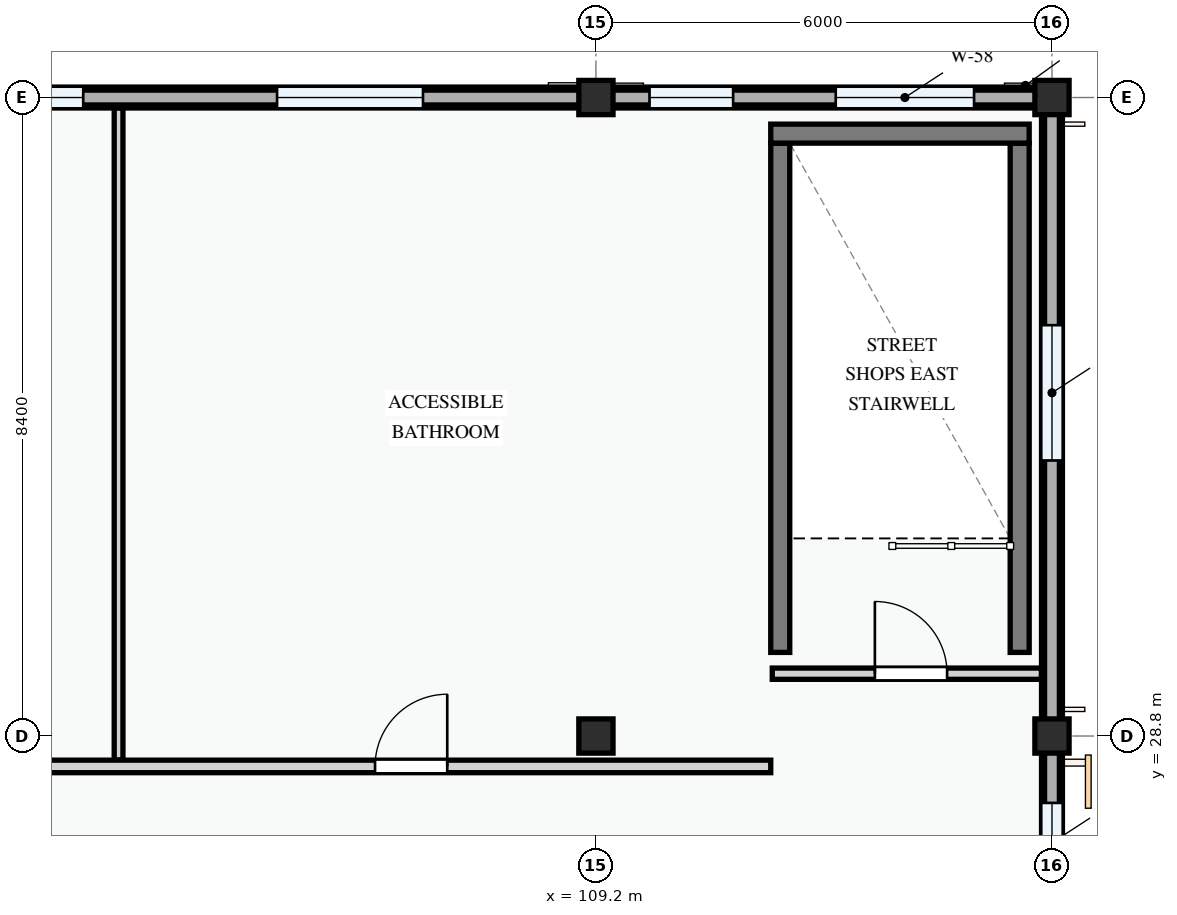
"""IFC4 building model, lengths in metres.
Left out: names, types, materials, properties, quantities, classifications, styles, units other than length and angle.
Written with IfcOpenShell. Run it as: python <this file> out.ifc"""

import sys

from ifc_helpers import new_model, si_unit, direction, frame, frame_2d, origin, origin_2d, place, context, subcontext, project, spatial, rectangle, extrude, element, fill, save


model = new_model("IFC4")
c1 = context("Model", 3, precision=1e-05, world=origin(), true_north=direction((0.0, 1.0)))
c2 = subcontext(c1, "Body", "Model", "MODEL_VIEW")
j1 = project(units=[si_unit("LENGTHUNIT", "METRE"), si_unit("PLANEANGLEUNIT", "RADIAN")], contexts=[c1])
p1 = place(None, origin())
s1 = spatial("IfcSite", under=j1, at=p1, CompositionType="ELEMENT")
p2 = place(p1, origin())
s2 = spatial("IfcBuilding", under=s1, at=p2, CompositionType="ELEMENT")
p3 = place(p2, frame((0.0, 0.0, 4.5)))
s3 = spatial("IfcBuildingStorey", under=s2, at=p3, CompositionType="ELEMENT", Elevation=4.5)
for number, where, z_axis, x_axis in (
    (1, (109.2, 28.8, 0.0), (0.0, 0.0, 1.0), (1.0, 0.0, 0.0)),
    (2, (109.2, 37.2, 0.0), (0.0, 0.0, 1.0), (1.0, 0.0, 0.0)),
    (3, (115.2, 28.8, 0.0), (0.0, 0.0, 1.0), (1.0, 0.0, 0.0)),
    (4, (115.2, 37.2, 0.0), (0.0, 0.0, 1.0), (1.0, 0.0, 0.0)),
):
    element("IfcColumn", number, at=place(p3, frame(where, z_axis=z_axis, x_axis=x_axis)), inside=s3, PredefinedType="COLUMN", context=c2, shape_type="SweptSolid", body=[
        extrude(rectangle(XDim=0.45, YDim=0.45, at=origin_2d()), origin(), (0.0, 0.0, 1.0), 3.6),
    ])
p4 = place(p3, frame((115.2, 22.8, 0.0), z_axis=(0.0, 0.0, 1.0), x_axis=(0.0, 1.0, 0.0)))
e5 = element("IfcWall", 5, at=p4, inside=s3, PredefinedType="STANDARD", context=c2, shape_type="SweptSolid", body=[
    extrude(rectangle(XDim=6.0, YDim=0.275, at=frame_2d((3.0, 0.0))), origin(), (0.0, 0.0, 1.0), 2.875),
])
p5 = place(p4, frame((1.075, 0.0, 0.8)))
e6 = element("IfcOpeningElement", 6, at=p5, cuts=e5, PredefinedType="OPENING", context=c2, shape_type="SweptSolid", body=[
    extrude(rectangle(XDim=1.42, YDim=1.38, at=frame_2d((0.71, 0.69))), frame((0.0, 0.147, 0.0), z_axis=(0.0, -1.0, 0.0), x_axis=(1.0, 0.0, 0.0)), (0.0, 0.0, 1.0), 0.295),
])
p6 = place(p4, frame((4.07, 0.0, 0.8)))
e7 = element("IfcOpeningElement", 7, at=p6, cuts=e5, PredefinedType="OPENING", context=c2, shape_type="SweptSolid", body=[
    extrude(rectangle(XDim=1.05, YDim=1.2, at=frame_2d((0.525, 0.6))), frame((0.0, 0.147, 0.0), z_axis=(0.0, -1.0, 0.0), x_axis=(1.0, 0.0, 0.0)), (0.0, 0.0, 1.0), 0.295),
])
p7 = place(p3, frame((115.2, 28.8, 0.0), z_axis=(0.0, 0.0, 1.0), x_axis=(0.0, 1.0, 0.0)))
e8 = element("IfcWall", 8, at=p7, inside=s3, PredefinedType="STANDARD", context=c2, shape_type="SweptSolid", body=[
    extrude(rectangle(XDim=8.4, YDim=0.275, at=frame_2d((4.2, 0.0))), origin(), (0.0, 0.0, 1.0), 2.725),
])
p8 = place(p7, frame((3.625, 0.0, 0.8)))
e9 = element("IfcOpeningElement", 9, at=p8, cuts=e8, PredefinedType="OPENING", context=c2, shape_type="SweptSolid", body=[
    extrude(rectangle(XDim=1.78, YDim=1.42, at=frame_2d((0.89, 0.71))), frame((0.0, 0.147, 0.0), z_axis=(0.0, -1.0, 0.0), x_axis=(1.0, 0.0, 0.0)), (0.0, 0.0, 1.0), 0.295),
])
p9 = place(p3, frame((115.2, 37.2, 0.0), z_axis=(0.0, 0.0, 1.0), x_axis=(-1.0, 0.0, 0.0)))
e10 = element("IfcWall", 10, at=p9, inside=s3, PredefinedType="STANDARD", context=c2, shape_type="SweptSolid", body=[
    extrude(rectangle(XDim=6.0, YDim=0.275, at=frame_2d((3.0, 0.0))), origin(), (0.0, 0.0, 1.0), 2.775),
])
p10 = place(p9, frame((1.025, 0.0, 0.8)))
e11 = element("IfcOpeningElement", 11, at=p10, cuts=e10, PredefinedType="OPENING", context=c2, shape_type="SweptSolid", body=[
    extrude(rectangle(XDim=1.82, YDim=1.46, at=frame_2d((0.91, 0.73))), frame((0.0, 0.147, 0.0), z_axis=(0.0, -1.0, 0.0), x_axis=(1.0, 0.0, 0.0)), (0.0, 0.0, 1.0), 0.295),
])
p11 = place(p9, frame((4.195, 0.0, 0.8)))
e12 = element("IfcOpeningElement", 12, at=p11, cuts=e10, PredefinedType="OPENING", context=c2, shape_type="SweptSolid", body=[
    extrude(rectangle(XDim=1.1, YDim=1.3, at=frame_2d((0.55, 0.65))), frame((0.0, 0.147, 0.0), z_axis=(0.0, -1.0, 0.0), x_axis=(1.0, 0.0, 0.0)), (0.0, 0.0, 1.0), 0.295),
])
p12 = place(p3, frame((109.2, 37.2, 0.0), z_axis=(0.0, 0.0, 1.0), x_axis=(-1.0, 0.0, 0.0)))
e13 = element("IfcWall", 13, at=p12, inside=s3, PredefinedType="STANDARD", context=c2, shape_type="SweptSolid", body=[
    extrude(rectangle(XDim=8.4, YDim=0.275, at=frame_2d((4.2, 0.0))), origin(), (0.0, 0.0, 1.0), 2.675),
])
p13 = place(p12, frame((2.275, 0.0, 0.8)))
e14 = element("IfcOpeningElement", 14, at=p13, cuts=e13, PredefinedType="OPENING", context=c2, shape_type="SweptSolid", body=[
    extrude(rectangle(XDim=1.92, YDim=1.44, at=frame_2d((0.96, 0.72))), frame((0.0, 0.147, 0.0), z_axis=(0.0, -1.0, 0.0), x_axis=(1.0, 0.0, 0.0)), (0.0, 0.0, 1.0), 0.295),
])
p14 = place(p12, frame((6.745, 0.0, 0.8)))
e15 = element("IfcOpeningElement", 15, at=p14, cuts=e13, PredefinedType="OPENING", context=c2, shape_type="SweptSolid", body=[
    extrude(rectangle(XDim=1.0, YDim=1.25, at=frame_2d((0.5, 0.625))), frame((0.0, 0.147, 0.0), z_axis=(0.0, -1.0, 0.0), x_axis=(1.0, 0.0, 0.0)), (0.0, 0.0, 1.0), 0.295),
])
p15 = place(p3, frame((115.2, 22.8, 3.6), z_axis=(0.0, 0.0, 1.0), x_axis=(0.0, 1.0, 0.0)))
e16 = element("IfcWall", 16, at=p15, inside=s3, PredefinedType="PARAPET", context=c2, shape_type="SweptSolid", body=[
    extrude(rectangle(XDim=14.4, YDim=0.195, at=frame_2d((7.2, 0.0))), origin(), (0.0, 0.0, 1.0), 1.15),
])
p16 = place(p3, frame((115.2, 37.2, 3.6), z_axis=(0.0, 0.0, 1.0), x_axis=(-1.0, 0.0, 0.0)))
e17 = element("IfcWall", 17, at=p16, inside=s3, PredefinedType="PARAPET", context=c2, shape_type="SweptSolid", body=[
    extrude(rectangle(XDim=49.2, YDim=0.195, at=frame_2d((24.6, 0.0))), origin(), (0.0, 0.0, 1.0), 1.15),
])
for number, where, z_axis, x_axis in (
    (18, (114.775, 29.9, 0.0), (0.0, 0.0, 1.0), (0.0, 1.0, 0.0)),
    (19, (111.625, 29.9, 0.0), (0.0, 0.0, 1.0), (0.0, 1.0, 0.0)),
):
    element("IfcWall", number, at=place(p3, frame(where, z_axis=z_axis, x_axis=x_axis)), inside=s3, PredefinedType="SHEAR", context=c2, shape_type="SweptSolid", body=[
        extrude(rectangle(XDim=6.7, YDim=0.25, at=frame_2d((3.35, 0.0))), origin(), (0.0, 0.0, 1.0), 3.3),
    ])
p17 = place(p3, frame((114.9, 36.725, 0.0), z_axis=(0.0, 0.0, 1.0), x_axis=(-1.0, 0.0, 0.0)))
e20 = element("IfcWall", 20, at=p17, inside=s3, PredefinedType="SHEAR", context=c2, shape_type="SweptSolid", body=[
    extrude(rectangle(XDim=3.4, YDim=0.25, at=frame_2d((1.7, 0.0))), origin(), (0.0, 0.0, 1.0), 3.3),
])
p18 = place(p3, frame((102.92, 28.485, 0.0), z_axis=(0.0, 0.0, 1.0), x_axis=(0.0, 1.0, 0.0)))
e21 = element("IfcWall", 21, at=p18, inside=s3, PredefinedType="PARTITIONING", context=c2, shape_type="SweptSolid", body=[
    extrude(rectangle(XDim=8.576, YDim=0.115, at=frame_2d((4.288, 0.0))), origin(), (0.0, 0.0, 1.0), 3.3),
])
p19 = place(p3, frame((111.52, 29.62, 0.0), z_axis=(0.0, 0.0, 1.0), x_axis=(1.0, 0.0, 0.0)))
e22 = element("IfcWall", 22, at=p19, inside=s3, PredefinedType="PARTITIONING", context=c2, shape_type="SweptSolid", body=[
    extrude(rectangle(XDim=3.541, YDim=0.148, at=frame_2d((1.77, 0.0))), origin(), (0.0, 0.0, 1.0), 3.3),
])
p20 = place(p19, frame((1.35, 0.0, 0.0)))
e23 = element("IfcOpeningElement", 23, at=p20, cuts=e22, PredefinedType="OPENING", context=c2, shape_type="SweptSolid", body=[
    extrude(rectangle(XDim=0.95, YDim=2.1, at=frame_2d((0.475, 1.05))), frame((0.0, 0.084, 0.0), z_axis=(0.0, -1.0, 0.0), x_axis=(1.0, 0.0, 0.0)), (0.0, 0.0, 1.0), 0.168),
])
p21 = place(p3, frame((69.75, 28.4, 0.0), z_axis=(0.0, 0.0, 1.0), x_axis=(1.0, 0.0, 0.0)))
e24 = element("IfcWall", 24, at=p21, inside=s3, PredefinedType="PARTITIONING", context=c2, shape_type="SweptSolid", body=[
    extrude(rectangle(XDim=41.75, YDim=0.165, at=frame_2d((20.875, 0.0))), origin(), (0.0, 0.0, 1.0), 2.675),
])
p22 = place(p21, frame((11.507, 0.0, 0.0)))
e25 = element("IfcOpeningElement", 25, at=p22, cuts=e24, PredefinedType="OPENING", context=c2, shape_type="SweptSolid", body=[
    extrude(rectangle(XDim=1.0, YDim=2.1, at=frame_2d((0.5, 1.05))), frame((0.0, 0.093, 0.0), z_axis=(0.0, -1.0, 0.0), x_axis=(1.0, 0.0, 0.0)), (0.0, 0.0, 1.0), 0.185),
])
p23 = place(p21, frame((28.472, 0.0, 0.0)))
e26 = element("IfcOpeningElement", 26, at=p23, cuts=e24, PredefinedType="OPENING", context=c2, shape_type="SweptSolid", body=[
    extrude(rectangle(XDim=0.95, YDim=2.1, at=frame_2d((0.475, 1.05))), frame((0.0, 0.093, 0.0), z_axis=(0.0, -1.0, 0.0), x_axis=(1.0, 0.0, 0.0)), (0.0, 0.0, 1.0), 0.185),
])
p24 = place(p21, frame((36.544, 0.0, 0.0)))
e27 = element("IfcOpeningElement", 27, at=p24, cuts=e24, PredefinedType="OPENING", context=c2, shape_type="SweptSolid", body=[
    extrude(rectangle(XDim=0.95, YDim=2.1, at=frame_2d((0.475, 1.05))), frame((0.0, 0.093, 0.0), z_axis=(0.0, -1.0, 0.0), x_axis=(1.0, 0.0, 0.0)), (0.0, 0.0, 1.0), 0.185),
])
p25 = place(p6, origin())
e28 = element("IfcWindow", 28, at=p25, inside=s3, PartitioningType="SINGLE_PANEL", PredefinedType="WINDOW", context=c2, shape_type="SweptSolid", body=[
    extrude(rectangle(XDim=1.05, YDim=1.2, at=frame_2d((0.525, 0.6))), frame((0.0, 0.03, 0.0), z_axis=(0.0, -1.0, 0.0), x_axis=(1.0, 0.0, 0.0)), (0.0, 0.0, 1.0), 0.06),
])
fill(e7, e28)
p26 = place(p8, origin())
e29 = element("IfcWindow", 29, at=p26, inside=s3, PartitioningType="DOUBLE_PANEL_VERTICAL", PredefinedType="WINDOW", context=c2, shape_type="SweptSolid", body=[
    extrude(rectangle(XDim=1.78, YDim=1.42, at=frame_2d((0.89, 0.71))), frame((0.0, 0.03, 0.0), z_axis=(0.0, -1.0, 0.0), x_axis=(1.0, 0.0, 0.0)), (0.0, 0.0, 1.0), 0.06),
])
fill(e9, e29)
p27 = place(p10, origin())
e30 = element("IfcWindow", 30, at=p27, inside=s3, PartitioningType="DOUBLE_PANEL_VERTICAL", PredefinedType="WINDOW", context=c2, shape_type="SweptSolid", body=[
    extrude(rectangle(XDim=1.82, YDim=1.46, at=frame_2d((0.91, 0.73))), frame((0.0, 0.03, 0.0), z_axis=(0.0, -1.0, 0.0), x_axis=(1.0, 0.0, 0.0)), (0.0, 0.0, 1.0), 0.06),
])
fill(e11, e30)
p28 = place(p11, origin())
e31 = element("IfcWindow", 31, at=p28, inside=s3, PartitioningType="SINGLE_PANEL", PredefinedType="WINDOW", context=c2, shape_type="SweptSolid", body=[
    extrude(rectangle(XDim=1.1, YDim=1.3, at=frame_2d((0.55, 0.65))), frame((0.0, 0.03, 0.0), z_axis=(0.0, -1.0, 0.0), x_axis=(1.0, 0.0, 0.0)), (0.0, 0.0, 1.0), 0.06),
])
fill(e12, e31)
p29 = place(p13, origin())
e32 = element("IfcWindow", 32, at=p29, inside=s3, PartitioningType="DOUBLE_PANEL_VERTICAL", PredefinedType="WINDOW", context=c2, shape_type="SweptSolid", body=[
    extrude(rectangle(XDim=1.92, YDim=1.44, at=frame_2d((0.96, 0.72))), frame((0.0, 0.03, 0.0), z_axis=(0.0, -1.0, 0.0), x_axis=(1.0, 0.0, 0.0)), (0.0, 0.0, 1.0), 0.06),
])
fill(e14, e32)
p30 = place(p14, origin())
e33 = element("IfcWindow", 33, at=p30, inside=s3, PartitioningType="SINGLE_PANEL", PredefinedType="WINDOW", context=c2, shape_type="SweptSolid", body=[
    extrude(rectangle(XDim=1.0, YDim=1.25, at=frame_2d((0.5, 0.625))), frame((0.0, 0.03, 0.0), z_axis=(0.0, -1.0, 0.0), x_axis=(1.0, 0.0, 0.0)), (0.0, 0.0, 1.0), 0.06),
])
fill(e15, e33)
p31 = place(p20, origin())
e34 = element("IfcDoor", 34, at=p31, inside=s3, OperationType="SINGLE_SWING_LEFT", PredefinedType="DOOR", context=c2, shape_type="SweptSolid", body=[
    extrude(rectangle(XDim=0.95, YDim=2.1, at=frame_2d((0.475, 1.05))), frame((0.0, 0.025, 0.0), z_axis=(0.0, -1.0, 0.0), x_axis=(1.0, 0.0, 0.0)), (0.0, 0.0, 1.0), 0.05),
])
fill(e23, e34)
p32 = place(p24, origin())
e35 = element("IfcDoor", 35, at=p32, inside=s3, OperationType="SINGLE_SWING_RIGHT", PredefinedType="DOOR", context=c2, shape_type="SweptSolid", body=[
    extrude(rectangle(XDim=0.95, YDim=2.1, at=frame_2d((0.475, 1.05))), frame((0.0, 0.025, 0.0), z_axis=(0.0, -1.0, 0.0), x_axis=(1.0, 0.0, 0.0)), (0.0, 0.0, 1.0), 0.05),
])
fill(e27, e35)
save(model, sys.argv[1])
